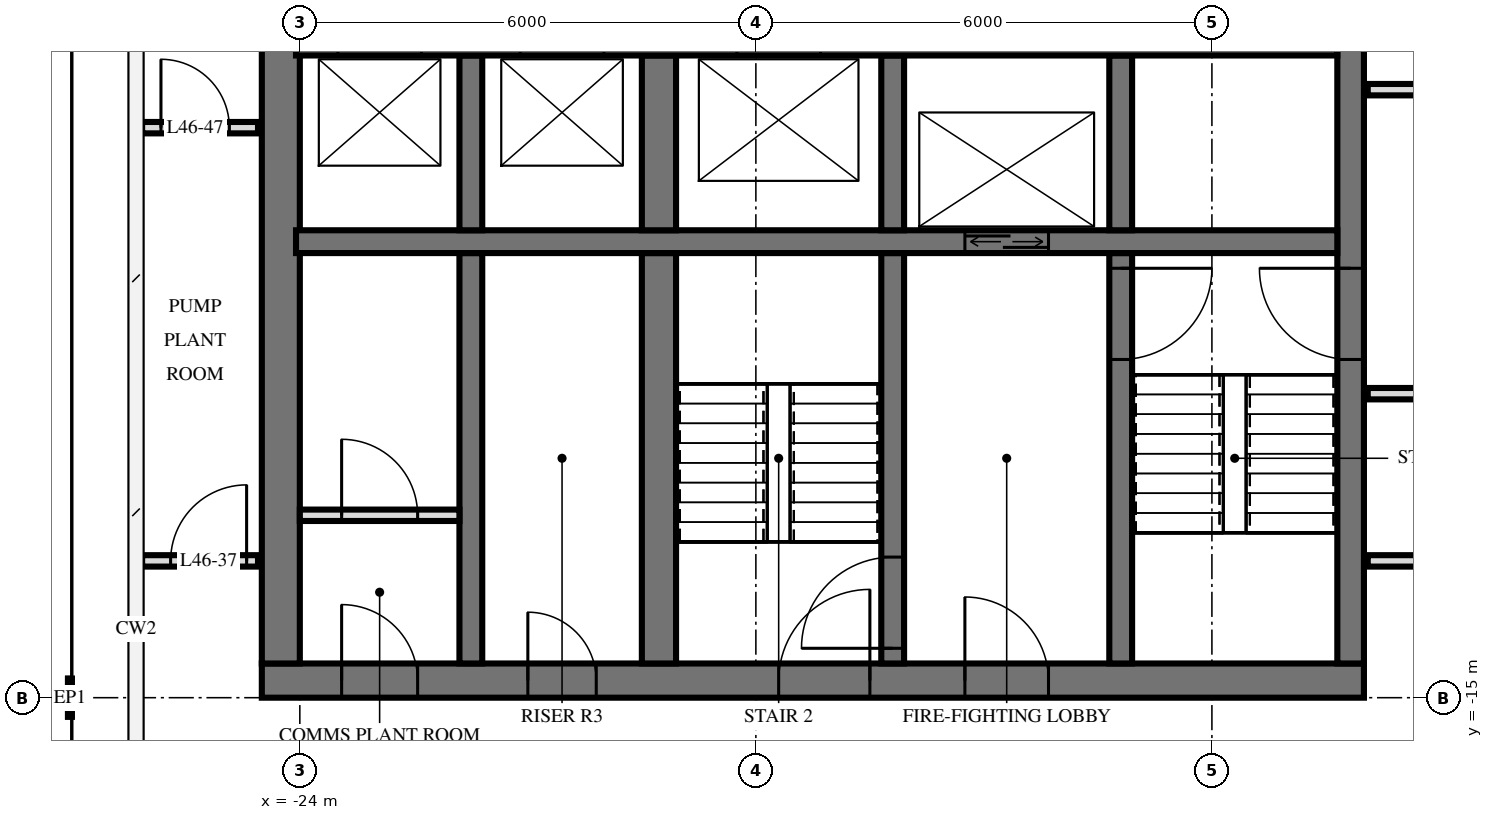
"""IFC4 building model, lengths in metres.
Left out: names, types, materials, properties, quantities, classifications, styles, units other than length and angle.
Written with IfcOpenShell. Run it as: python <this file> out.ifc"""

import sys

from ifc_helpers import new_model, si_unit, direction, frame, frame_2d, origin, place, context, subcontext, project, spatial, rectangle, extrude, element, fill, save


model = new_model("IFC4")
c1 = context("Model", 3, precision=1e-05, world=origin(), true_north=direction((0.0, 1.0)))
c2 = subcontext(c1, "Body", "Model", "MODEL_VIEW")
j1 = project(units=[si_unit("LENGTHUNIT", "METRE"), si_unit("PLANEANGLEUNIT", "RADIAN")], contexts=[c1])
p1 = place(None, origin())
s1 = spatial("IfcSite", under=j1, at=p1, CompositionType="ELEMENT")
p2 = place(p1, origin())
s2 = spatial("IfcBuilding", under=s1, at=p2, CompositionType="ELEMENT")
p3 = place(p2, frame((0.0, 0.0, 177.6)))
s3 = spatial("IfcBuildingStorey", under=s2, at=p3, CompositionType="ELEMENT", Elevation=177.6)
p4 = place(p3, frame((-24.5, -14.775, 0.0), z_axis=(0.0, 0.0, 1.0), x_axis=(1.0, 0.0, 0.0)))
e1 = element("IfcWall", 1, at=p4, inside=s3, PredefinedType="SHEAR", context=c2, shape_type="SweptSolid", body=[
    extrude(rectangle(XDim=14.5, YDim=0.45, at=frame_2d((7.25, 0.0))), origin(), (0.0, 0.0, 1.0), 6.0),
])
p5 = place(p4, frame((6.8, 0.0, 0.0)))
e2 = element("IfcOpeningElement", 2, at=p5, cuts=e1, PredefinedType="OPENING", context=c2, shape_type="SweptSolid", body=[
    extrude(rectangle(XDim=1.2, YDim=2.1, at=frame_2d((0.6, 1.05))), frame((0.0, 0.235, 0.0), z_axis=(0.0, -1.0, 0.0), x_axis=(1.0, 0.0, 0.0)), (0.0, 0.0, 1.0), 0.47),
])
p6 = place(p4, frame((9.25, 0.0, 0.0)))
e3 = element("IfcOpeningElement", 3, at=p6, cuts=e1, PredefinedType="OPENING", context=c2, shape_type="SweptSolid", body=[
    extrude(rectangle(XDim=1.1, YDim=2.1, at=frame_2d((0.55, 1.05))), frame((0.0, 0.235, 0.0), z_axis=(0.0, -1.0, 0.0), x_axis=(1.0, 0.0, 0.0)), (0.0, 0.0, 1.0), 0.47),
])
p7 = place(p4, frame((3.5, 0.0, 0.0)))
e4 = element("IfcOpeningElement", 4, at=p7, cuts=e1, PredefinedType="OPENING", context=c2, shape_type="SweptSolid", body=[
    extrude(rectangle(XDim=0.9, YDim=2.1, at=frame_2d((0.45, 1.05))), frame((0.0, 0.235, 0.0), z_axis=(0.0, -1.0, 0.0), x_axis=(1.0, 0.0, 0.0)), (0.0, 0.0, 1.0), 0.47),
])
p8 = place(p4, frame((1.05, 0.0, 0.0)))
e5 = element("IfcOpeningElement", 5, at=p8, cuts=e1, PredefinedType="OPENING", context=c2, shape_type="SweptSolid", body=[
    extrude(rectangle(XDim=1.0, YDim=2.1, at=frame_2d((0.5, 1.05))), frame((0.0, 0.235, 0.0), z_axis=(0.0, -1.0, 0.0), x_axis=(1.0, 0.0, 0.0)), (0.0, 0.0, 1.0), 0.47),
])
p9 = place(p3, frame((-10.175, -14.55, 0.0), z_axis=(0.0, 0.0, 1.0), x_axis=(0.0, 1.0, 0.0)))
e6 = element("IfcWall", 6, at=p9, inside=s3, PredefinedType="SHEAR", context=c2, shape_type="SweptSolid", body=[
    extrude(rectangle(XDim=14.1, YDim=0.35, at=frame_2d((7.05, 0.0))), origin(), (0.0, 0.0, 1.0), 6.0),
])
p10 = place(p9, frame((8.4, 0.0, 0.0)))
e7 = element("IfcOpeningElement", 7, at=p10, cuts=e6, PredefinedType="OPENING", context=c2, shape_type="SweptSolid", body=[
    extrude(rectangle(XDim=1.4, YDim=2.4, at=frame_2d((0.7, 1.2))), frame((0.0, 0.185, 0.0), z_axis=(0.0, -1.0, 0.0), x_axis=(1.0, 0.0, 0.0)), (0.0, 0.0, 1.0), 0.37),
])
p11 = place(p9, frame((10.0, 0.0, 0.0)))
e8 = element("IfcOpeningElement", 8, at=p11, cuts=e6, PredefinedType="OPENING", context=c2, shape_type="SweptSolid", body=[
    extrude(rectangle(XDim=1.4, YDim=2.4, at=frame_2d((0.7, 1.2))), frame((0.0, 0.185, 0.0), z_axis=(0.0, -1.0, 0.0), x_axis=(1.0, 0.0, 0.0)), (0.0, 0.0, 1.0), 0.37),
])
p12 = place(p9, frame((4.0, 0.0, 0.0)))
e9 = element("IfcOpeningElement", 9, at=p12, cuts=e6, PredefinedType="OPENING", context=c2, shape_type="SweptSolid", body=[
    extrude(rectangle(XDim=1.2, YDim=2.1, at=frame_2d((0.6, 1.05))), frame((0.0, 0.185, 0.0), z_axis=(0.0, -1.0, 0.0), x_axis=(1.0, 0.0, 0.0)), (0.0, 0.0, 1.0), 0.37),
])
p13 = place(p3, frame((-24.25, -14.55, 0.0), z_axis=(0.0, 0.0, 1.0), x_axis=(0.0, 1.0, 0.0)))
e10 = element("IfcWall", 10, at=p13, inside=s3, PredefinedType="SHEAR", context=c2, shape_type="SweptSolid", body=[
    extrude(rectangle(XDim=14.1, YDim=0.5, at=frame_2d((7.05, 0.0))), origin(), (0.0, 0.0, 1.0), 6.0),
])
p14 = place(p3, frame((-24.05, -6.4, 0.0), z_axis=(0.0, 0.0, 1.0), x_axis=(1.0, 0.0, 0.0)))
e11 = element("IfcWall", 11, at=p14, inside=s3, PredefinedType="SHEAR", context=c2, shape_type="SweptSolid", body=[
    extrude(rectangle(XDim=13.7, YDim=0.3, at=frame_2d((6.85, 0.0))), origin(), (0.0, 0.0, 1.0), 6.0),
])
p15 = place(p14, frame((2.95, 0.0, 0.0)))
e12 = element("IfcOpeningElement", 12, at=p15, cuts=e11, PredefinedType="OPENING", context=c2, shape_type="SweptSolid", body=[
    extrude(rectangle(XDim=1.1, YDim=2.1, at=frame_2d((0.55, 1.05))), frame((0.0, 0.16, 0.0), z_axis=(0.0, -1.0, 0.0), x_axis=(1.0, 0.0, 0.0)), (0.0, 0.0, 1.0), 0.32),
])
p16 = place(p14, frame((0.55, 0.0, 0.0)))
e13 = element("IfcOpeningElement", 13, at=p16, cuts=e11, PredefinedType="OPENING", context=c2, shape_type="SweptSolid", body=[
    extrude(rectangle(XDim=1.1, YDim=2.1, at=frame_2d((0.55, 1.05))), frame((0.0, 0.16, 0.0), z_axis=(0.0, -1.0, 0.0), x_axis=(1.0, 0.0, 0.0)), (0.0, 0.0, 1.0), 0.32),
])
p17 = place(p14, frame((5.8, 0.0, 0.0)))
e14 = element("IfcOpeningElement", 14, at=p17, cuts=e11, PredefinedType="OPENING", context=c2, shape_type="SweptSolid", body=[
    extrude(rectangle(XDim=1.1, YDim=2.1, at=frame_2d((0.55, 1.05))), frame((0.0, 0.16, 0.0), z_axis=(0.0, -1.0, 0.0), x_axis=(1.0, 0.0, 0.0)), (0.0, 0.0, 1.0), 0.32),
])
p18 = place(p3, frame((-24.05, -9.0, 0.0), z_axis=(0.0, 0.0, 1.0), x_axis=(1.0, 0.0, 0.0)))
e15 = element("IfcWall", 15, at=p18, inside=s3, PredefinedType="SHEAR", context=c2, shape_type="SweptSolid", body=[
    extrude(rectangle(XDim=13.7, YDim=0.3, at=frame_2d((6.85, 0.0))), origin(), (0.0, 0.0, 1.0), 6.0),
])
p19 = place(p18, frame((8.8, 0.0, 0.0)))
e16 = element("IfcOpeningElement", 16, at=p19, cuts=e15, PredefinedType="OPENING", context=c2, shape_type="SweptSolid", body=[
    extrude(rectangle(XDim=1.1, YDim=2.1, at=frame_2d((0.55, 1.05))), frame((0.0, 0.16, 0.0), z_axis=(0.0, -1.0, 0.0), x_axis=(1.0, 0.0, 0.0)), (0.0, 0.0, 1.0), 0.32),
])
p20 = place(p3, frame((-13.2, -8.85, 0.0), z_axis=(0.0, 0.0, 1.0), x_axis=(0.0, 1.0, 0.0)))
e17 = element("IfcWall", 17, at=p20, inside=s3, PredefinedType="SHEAR", context=c2, shape_type="SweptSolid", body=[
    extrude(rectangle(XDim=2.3, YDim=0.3, at=frame_2d((1.15, 0.0))), origin(), (0.0, 0.0, 1.0), 6.0),
])
p21 = place(p3, frame((-13.2, -14.55, 0.0), z_axis=(0.0, 0.0, 1.0), x_axis=(0.0, 1.0, 0.0)))
e18 = element("IfcWall", 18, at=p21, inside=s3, PredefinedType="SHEAR", context=c2, shape_type="SweptSolid", body=[
    extrude(rectangle(XDim=5.4, YDim=0.3, at=frame_2d((2.7, 0.0))), origin(), (0.0, 0.0, 1.0), 6.0),
])
p22 = place(p21, frame((4.0, 0.0, 0.0)))
e19 = element("IfcOpeningElement", 19, at=p22, cuts=e18, PredefinedType="OPENING", context=c2, shape_type="SweptSolid", body=[
    extrude(rectangle(XDim=1.2, YDim=2.1, at=frame_2d((0.6, 1.05))), frame((0.0, 0.16, 0.0), z_axis=(0.0, -1.0, 0.0), x_axis=(1.0, 0.0, 0.0)), (0.0, 0.0, 1.0), 0.32),
])
p23 = place(p3, frame((-16.2, -8.85, 0.0), z_axis=(0.0, 0.0, 1.0), x_axis=(0.0, 1.0, 0.0)))
e20 = element("IfcWall", 20, at=p23, inside=s3, PredefinedType="SHEAR", context=c2, shape_type="SweptSolid", body=[
    extrude(rectangle(XDim=2.3, YDim=0.3, at=frame_2d((1.15, 0.0))), origin(), (0.0, 0.0, 1.0), 6.0),
])
p24 = place(p3, frame((-16.2, -14.55, 0.0), z_axis=(0.0, 0.0, 1.0), x_axis=(0.0, 1.0, 0.0)))
e21 = element("IfcWall", 21, at=p24, inside=s3, PredefinedType="SHEAR", context=c2, shape_type="SweptSolid", body=[
    extrude(rectangle(XDim=5.4, YDim=0.3, at=frame_2d((2.7, 0.0))), origin(), (0.0, 0.0, 1.0), 6.0),
])
p25 = place(p24, frame((0.2, 0.0, 0.0)))
e22 = element("IfcOpeningElement", 22, at=p25, cuts=e21, PredefinedType="OPENING", context=c2, shape_type="SweptSolid", body=[
    extrude(rectangle(XDim=1.2, YDim=2.1, at=frame_2d((0.6, 1.05))), frame((0.0, 0.16, 0.0), z_axis=(0.0, -1.0, 0.0), x_axis=(1.0, 0.0, 0.0)), (0.0, 0.0, 1.0), 0.32),
])
p26 = place(p3, frame((-19.275, -8.85, 0.0), z_axis=(0.0, 0.0, 1.0), x_axis=(0.0, 1.0, 0.0)))
e23 = element("IfcWall", 23, at=p26, inside=s3, PredefinedType="SHEAR", context=c2, shape_type="SweptSolid", body=[
    extrude(rectangle(XDim=2.3, YDim=0.45, at=frame_2d((1.15, 0.0))), origin(), (0.0, 0.0, 1.0), 6.0),
])
p27 = place(p3, frame((-19.275, -14.55, 0.0), z_axis=(0.0, 0.0, 1.0), x_axis=(0.0, 1.0, 0.0)))
e24 = element("IfcWall", 24, at=p27, inside=s3, PredefinedType="SHEAR", context=c2, shape_type="SweptSolid", body=[
    extrude(rectangle(XDim=5.4, YDim=0.45, at=frame_2d((2.7, 0.0))), origin(), (0.0, 0.0, 1.0), 6.0),
])
p28 = place(p3, frame((-21.75, -8.85, 0.0), z_axis=(0.0, 0.0, 1.0), x_axis=(0.0, 1.0, 0.0)))
e25 = element("IfcWall", 25, at=p28, inside=s3, PredefinedType="SHEAR", context=c2, shape_type="SweptSolid", body=[
    extrude(rectangle(XDim=2.3, YDim=0.3, at=frame_2d((1.15, 0.0))), origin(), (0.0, 0.0, 1.0), 6.0),
])
p29 = place(p3, frame((-21.75, -14.55, 0.0), z_axis=(0.0, 0.0, 1.0), x_axis=(0.0, 1.0, 0.0)))
e26 = element("IfcWall", 26, at=p29, inside=s3, PredefinedType="SHEAR", context=c2, shape_type="SweptSolid", body=[
    extrude(rectangle(XDim=5.4, YDim=0.3, at=frame_2d((2.7, 0.0))), origin(), (0.0, 0.0, 1.0), 6.0),
])
p30 = place(p3, frame((-24.0, -12.6, 0.0), z_axis=(0.0, 0.0, 1.0), x_axis=(1.0, 0.0, 0.0)))
e27 = element("IfcWall", 27, at=p30, inside=s3, PredefinedType="PARTITIONING", context=c2, shape_type="SweptSolid", body=[
    extrude(rectangle(XDim=2.1, YDim=0.15, at=frame_2d((1.05, 0.0))), origin(), (0.0, 0.0, 1.0), 5.7),
])
p31 = place(p30, frame((0.55, 0.0, 0.0)))
e28 = element("IfcOpeningElement", 28, at=p31, cuts=e27, PredefinedType="OPENING", context=c2, shape_type="SweptSolid", body=[
    extrude(rectangle(XDim=1.0, YDim=2.1, at=frame_2d((0.5, 1.05))), frame((0.0, 0.085, 0.0), z_axis=(0.0, -1.0, 0.0), x_axis=(1.0, 0.0, 0.0)), (0.0, 0.0, 1.0), 0.17),
])
p32 = place(p3, frame((-26.075, -13.2, 0.0), z_axis=(0.0, 0.0, 1.0), x_axis=(1.0, 0.0, 0.0)))
e29 = element("IfcWall", 29, at=p32, inside=s3, PredefinedType="PARTITIONING", context=c2, shape_type="SweptSolid", body=[
    extrude(rectangle(XDim=1.525, YDim=0.15, at=frame_2d((0.762, 0.0))), origin(), (0.0, 0.0, 1.0), 5.7),
])
p33 = place(p32, frame((0.375, 0.0, 0.0)))
e30 = element("IfcOpeningElement", 30, at=p33, cuts=e29, PredefinedType="OPENING", context=c2, shape_type="SweptSolid", body=[
    extrude(rectangle(XDim=1.0, YDim=2.1, at=frame_2d((0.5, 1.05))), frame((0.0, 0.085, 0.0), z_axis=(0.0, -1.0, 0.0), x_axis=(1.0, 0.0, 0.0)), (0.0, 0.0, 1.0), 0.17),
])
p34 = place(p3, frame((-9.95, -13.2, 0.0), z_axis=(0.0, 0.0, 1.0), x_axis=(1.0, 0.0, 0.0)))
e31 = element("IfcWall", 31, at=p34, inside=s3, PredefinedType="PARTITIONING", context=c2, shape_type="SweptSolid", body=[
    extrude(rectangle(XDim=19.9, YDim=0.15, at=frame_2d((9.95, 0.0))), origin(), (0.0, 0.0, 1.0), 5.7),
])
p35 = place(p34, frame((7.0, 0.0, 0.0)))
e32 = element("IfcOpeningElement", 32, at=p35, cuts=e31, PredefinedType="OPENING", context=c2, shape_type="SweptSolid", body=[
    extrude(rectangle(XDim=1.0, YDim=2.1, at=frame_2d((0.5, 1.05))), frame((0.0, 0.085, 0.0), z_axis=(0.0, -1.0, 0.0), x_axis=(1.0, 0.0, 0.0)), (0.0, 0.0, 1.0), 0.17),
])
p36 = place(p3, frame((-9.95, -11.0, 0.0), z_axis=(0.0, 0.0, 1.0), x_axis=(1.0, 0.0, 0.0)))
e33 = element("IfcWall", 33, at=p36, inside=s3, PredefinedType="PARTITIONING", context=c2, shape_type="SweptSolid", body=[
    extrude(rectangle(XDim=19.9, YDim=0.15, at=frame_2d((9.95, 0.0))), origin(), (0.0, 0.0, 1.0), 5.7),
])
p37 = place(p36, frame((9.45, 0.0, 0.0)))
e34 = element("IfcOpeningElement", 34, at=p37, cuts=e33, PredefinedType="OPENING", context=c2, shape_type="SweptSolid", body=[
    extrude(rectangle(XDim=1.0, YDim=2.1, at=frame_2d((0.5, 1.05))), frame((0.0, 0.085, 0.0), z_axis=(0.0, -1.0, 0.0), x_axis=(1.0, 0.0, 0.0)), (0.0, 0.0, 1.0), 0.17),
])
p38 = place(p36, frame((15.45, 0.0, 0.0)))
e35 = element("IfcOpeningElement", 35, at=p38, cuts=e33, PredefinedType="OPENING", context=c2, shape_type="SweptSolid", body=[
    extrude(rectangle(XDim=1.0, YDim=2.1, at=frame_2d((0.5, 1.05))), frame((0.0, 0.085, 0.0), z_axis=(0.0, -1.0, 0.0), x_axis=(1.0, 0.0, 0.0)), (0.0, 0.0, 1.0), 0.17),
])
p39 = place(p3, frame((-26.075, -7.5, 0.0), z_axis=(0.0, 0.0, 1.0), x_axis=(1.0, 0.0, 0.0)))
e36 = element("IfcWall", 36, at=p39, inside=s3, PredefinedType="PARTITIONING", context=c2, shape_type="SweptSolid", body=[
    extrude(rectangle(XDim=1.525, YDim=0.15, at=frame_2d((0.762, 0.0))), origin(), (0.0, 0.0, 1.0), 5.7),
])
p40 = place(p39, frame((0.248, 0.0, 0.0)))
e37 = element("IfcOpeningElement", 37, at=p40, cuts=e36, PredefinedType="OPENING", context=c2, shape_type="SweptSolid", body=[
    extrude(rectangle(XDim=0.9, YDim=2.1, at=frame_2d((0.45, 1.05))), frame((0.0, 0.085, 0.0), z_axis=(0.0, -1.0, 0.0), x_axis=(1.0, 0.0, 0.0)), (0.0, 0.0, 1.0), 0.17),
])
p41 = place(p3, frame((-9.95, -7.0, 0.0), z_axis=(0.0, 0.0, 1.0), x_axis=(1.0, 0.0, 0.0)))
e38 = element("IfcWall", 38, at=p41, inside=s3, PredefinedType="PARTITIONING", context=c2, shape_type="SweptSolid", body=[
    extrude(rectangle(XDim=19.9, YDim=0.15, at=frame_2d((9.95, 0.0))), origin(), (0.0, 0.0, 1.0), 5.7),
])
p42 = place(p41, frame((9.45, 0.0, 0.0)))
e39 = element("IfcOpeningElement", 39, at=p42, cuts=e38, PredefinedType="OPENING", context=c2, shape_type="SweptSolid", body=[
    extrude(rectangle(XDim=1.0, YDim=2.1, at=frame_2d((0.5, 1.05))), frame((0.0, 0.085, 0.0), z_axis=(0.0, -1.0, 0.0), x_axis=(1.0, 0.0, 0.0)), (0.0, 0.0, 1.0), 0.17),
])
p43 = place(p41, frame((2.0, 0.0, 0.0)))
e40 = element("IfcOpeningElement", 40, at=p43, cuts=e38, PredefinedType="OPENING", context=c2, shape_type="SweptSolid", body=[
    extrude(rectangle(XDim=1.0, YDim=2.1, at=frame_2d((0.5, 1.05))), frame((0.0, 0.085, 0.0), z_axis=(0.0, -1.0, 0.0), x_axis=(1.0, 0.0, 0.0)), (0.0, 0.0, 1.0), 0.17),
])
p44 = place(p19, origin())
e41 = element("IfcDoor", 41, at=p44, inside=s3, OperationType="DOUBLE_DOOR_SLIDING", PredefinedType="USERDEFINED", context=c2, shape_type="SweptSolid", body=[
    extrude(rectangle(XDim=1.1, YDim=2.1, at=frame_2d((0.55, 1.05))), frame((0.0, 0.025, 0.0), z_axis=(0.0, -1.0, 0.0), x_axis=(1.0, 0.0, 0.0)), (0.0, 0.0, 1.0), 0.05),
])
fill(e16, e41)
p45 = place(p12, origin())
e42 = element("IfcDoor", 42, at=p45, inside=s3, OperationType="SINGLE_SWING_LEFT", PredefinedType="DOOR", context=c2, shape_type="SweptSolid", body=[
    extrude(rectangle(XDim=1.2, YDim=2.1, at=frame_2d((0.6, 1.05))), frame((0.0, 0.025, 0.0), z_axis=(0.0, -1.0, 0.0), x_axis=(1.0, 0.0, 0.0)), (0.0, 0.0, 1.0), 0.05),
])
fill(e9, e42)
p46 = place(p5, origin())
e43 = element("IfcDoor", 43, at=p46, inside=s3, OperationType="SINGLE_SWING_LEFT", PredefinedType="DOOR", context=c2, shape_type="SweptSolid", body=[
    extrude(rectangle(XDim=1.2, YDim=2.1, at=frame_2d((0.6, 1.05))), frame((0.0, 0.025, 0.0), z_axis=(0.0, -1.0, 0.0), x_axis=(1.0, 0.0, 0.0)), (0.0, 0.0, 1.0), 0.05),
])
fill(e2, e43)
p47 = place(p6, origin())
e44 = element("IfcDoor", 44, at=p47, inside=s3, OperationType="SINGLE_SWING_RIGHT", PredefinedType="DOOR", context=c2, shape_type="SweptSolid", body=[
    extrude(rectangle(XDim=1.1, YDim=2.1, at=frame_2d((0.55, 1.05))), frame((0.0, 0.025, 0.0), z_axis=(0.0, -1.0, 0.0), x_axis=(1.0, 0.0, 0.0)), (0.0, 0.0, 1.0), 0.05),
])
fill(e3, e44)
p48 = place(p7, origin())
e45 = element("IfcDoor", 45, at=p48, inside=s3, OperationType="SINGLE_SWING_RIGHT", PredefinedType="DOOR", context=c2, shape_type="SweptSolid", body=[
    extrude(rectangle(XDim=0.9, YDim=2.1, at=frame_2d((0.45, 1.05))), frame((0.0, 0.025, 0.0), z_axis=(0.0, -1.0, 0.0), x_axis=(1.0, 0.0, 0.0)), (0.0, 0.0, 1.0), 0.05),
])
fill(e4, e45)
p49 = place(p8, origin())
e46 = element("IfcDoor", 46, at=p49, inside=s3, OperationType="SINGLE_SWING_RIGHT", PredefinedType="DOOR", context=c2, shape_type="SweptSolid", body=[
    extrude(rectangle(XDim=1.0, YDim=2.1, at=frame_2d((0.5, 1.05))), frame((0.0, 0.025, 0.0), z_axis=(0.0, -1.0, 0.0), x_axis=(1.0, 0.0, 0.0)), (0.0, 0.0, 1.0), 0.05),
])
fill(e5, e46)
p50 = place(p22, frame((0.6, 0.0, 0.0), z_axis=(0.0, 0.0, 1.0), x_axis=(-1.0, 0.0, 0.0)))
e47 = element("IfcDoor", 47, at=p50, inside=s3, OperationType="SINGLE_SWING_RIGHT", PredefinedType="DOOR", context=c2, shape_type="SweptSolid", body=[
    extrude(rectangle(XDim=1.2, YDim=2.1, at=frame_2d((0.0, 1.05))), frame((0.0, -0.025, 0.0), z_axis=(0.0, 1.0, 0.0), x_axis=(-1.0, 0.0, 0.0)), (0.0, 0.0, 1.0), 0.05),
])
fill(e19, e47)
p51 = place(p25, origin())
e48 = element("IfcDoor", 48, at=p51, inside=s3, OperationType="SINGLE_SWING_RIGHT", PredefinedType="DOOR", context=c2, shape_type="SweptSolid", body=[
    extrude(rectangle(XDim=1.2, YDim=2.1, at=frame_2d((0.6, 1.05))), frame((0.0, 0.025, 0.0), z_axis=(0.0, -1.0, 0.0), x_axis=(1.0, 0.0, 0.0)), (0.0, 0.0, 1.0), 0.05),
])
fill(e22, e48)
p52 = place(p31, origin())
e49 = element("IfcDoor", 49, at=p52, inside=s3, OperationType="SINGLE_SWING_RIGHT", PredefinedType="DOOR", context=c2, shape_type="SweptSolid", body=[
    extrude(rectangle(XDim=1.0, YDim=2.1, at=frame_2d((0.5, 1.05))), frame((0.0, 0.025, 0.0), z_axis=(0.0, -1.0, 0.0), x_axis=(1.0, 0.0, 0.0)), (0.0, 0.0, 1.0), 0.05),
])
fill(e28, e49)
p53 = place(p33, origin())
e50 = element("IfcDoor", 50, at=p53, inside=s3, OperationType="SINGLE_SWING_LEFT", PredefinedType="DOOR", context=c2, shape_type="SweptSolid", body=[
    extrude(rectangle(XDim=1.0, YDim=2.1, at=frame_2d((0.5, 1.05))), frame((0.0, 0.025, 0.0), z_axis=(0.0, -1.0, 0.0), x_axis=(1.0, 0.0, 0.0)), (0.0, 0.0, 1.0), 0.05),
])
fill(e30, e50)
p54 = place(p40, origin())
e51 = element("IfcDoor", 51, at=p54, inside=s3, OperationType="SINGLE_SWING_RIGHT", PredefinedType="DOOR", context=c2, shape_type="SweptSolid", body=[
    extrude(rectangle(XDim=0.9, YDim=2.1, at=frame_2d((0.45, 1.05))), frame((0.0, 0.025, 0.0), z_axis=(0.0, -1.0, 0.0), x_axis=(1.0, 0.0, 0.0)), (0.0, 0.0, 1.0), 0.05),
])
fill(e37, e51)
save(model, sys.argv[1])
